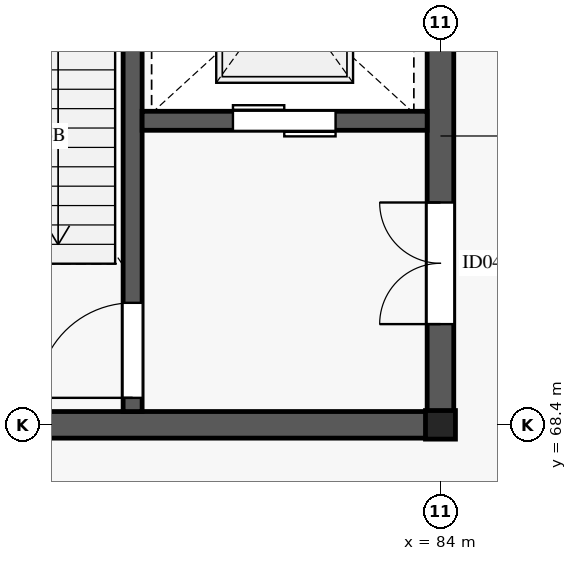
"""IFC4 building model, lengths in metres.
Left out: names, types, materials, properties, quantities, classifications, styles, units other than length and angle.
Written with IfcOpenShell. Run it as: python <this file> out.ifc"""

import sys

from ifc_helpers import new_model, si_unit, direction, frame, frame_2d, origin, origin_2d, place, context, subcontext, project, spatial, rectangle, i_section, extrude, element, fill, save


model = new_model("IFC4")
c1 = context("Model", 3, precision=1e-05, world=origin(), true_north=direction((0.0, 1.0)))
c2 = subcontext(c1, "Body", "Model", "MODEL_VIEW")
j1 = project(units=[si_unit("LENGTHUNIT", "METRE"), si_unit("PLANEANGLEUNIT", "RADIAN")], contexts=[c1])
p1 = place(None, origin())
s1 = spatial("IfcSite", under=j1, at=p1, CompositionType="ELEMENT")
p2 = place(p1, origin())
s2 = spatial("IfcBuilding", under=s1, at=p2, CompositionType="ELEMENT")
p3 = place(p2, frame((0.0, 0.0, 10.8)))
s3 = spatial("IfcBuildingStorey", under=s2, at=p3, CompositionType="ELEMENT", Elevation=10.8)
p4 = place(p3, frame((84.0, 68.4, 0.0), z_axis=(0.0, 0.0, 1.0), x_axis=(1.0, 0.0, 0.0)))
e1 = element("IfcColumn", 1, at=p4, inside=s3, PredefinedType="COLUMN", context=c2, shape_type="SweptSolid", body=[
    extrude(i_section(OverallWidth=0.394, OverallDepth=0.376, WebThickness=0.017, FlangeThickness=0.028, FilletRadius=0.015, at=origin_2d()), origin(), (0.0, 0.0, 1.0), 4.59),
])
p5 = place(p3, frame((75.825, 68.4, 0.0), z_axis=(0.0, 0.0, 1.0), x_axis=(1.0, 0.0, 0.0)))
e2 = element("IfcWall", 2, at=p5, inside=s3, PredefinedType="SHEAR", context=c2, shape_type="SweptSolid", body=[
    extrude(rectangle(XDim=8.35, YDim=0.35, at=frame_2d((4.175, 0.0))), origin(), (0.0, 0.0, 1.0), 4.59),
])
p6 = place(p3, frame((84.0, 68.575, 0.0), z_axis=(0.0, 0.0, 1.0), x_axis=(0.0, 1.0, 0.0)))
e3 = element("IfcWall", 3, at=p6, inside=s3, PredefinedType="SHEAR", context=c2, shape_type="SweptSolid", body=[
    extrude(rectangle(XDim=7.25, YDim=0.35, at=frame_2d((3.625, 0.0))), origin(), (0.0, 0.0, 1.0), 4.59),
])
p7 = place(p6, frame((1.15, 0.0, 0.0)))
e4 = element("IfcOpeningElement", 4, at=p7, cuts=e3, PredefinedType="OPENING", context=c2, shape_type="SweptSolid", body=[
    extrude(rectangle(XDim=1.6, YDim=2.35, at=frame_2d((0.8, 1.175))), frame((0.0, 0.185, 0.0), z_axis=(0.0, -1.0, 0.0), x_axis=(1.0, 0.0, 0.0)), (0.0, 0.0, 1.0), 0.37),
])
p8 = place(p3, frame((79.95, 68.575, 0.0), z_axis=(0.0, 0.0, 1.0), x_axis=(0.0, 1.0, 0.0)))
e5 = element("IfcWall", 5, at=p8, inside=s3, PredefinedType="SHEAR", context=c2, shape_type="SweptSolid", body=[
    extrude(rectangle(XDim=7.25, YDim=0.25, at=frame_2d((3.625, 0.0))), origin(), (0.0, 0.0, 1.0), 4.59),
])
p9 = place(p8, frame((0.18, 0.0, 0.0)))
e6 = element("IfcOpeningElement", 6, at=p9, cuts=e5, PredefinedType="OPENING", context=c2, shape_type="SweptSolid", body=[
    extrude(rectangle(XDim=1.25, YDim=2.2, at=frame_2d((0.625, 1.1))), frame((0.0, 0.135, 0.0), z_axis=(0.0, -1.0, 0.0), x_axis=(1.0, 0.0, 0.0)), (0.0, 0.0, 1.0), 0.27),
])
p10 = place(p3, frame((80.075, 72.4, 0.0), z_axis=(0.0, 0.0, 1.0), x_axis=(1.0, 0.0, 0.0)))
e7 = element("IfcWall", 7, at=p10, inside=s3, PredefinedType="SHEAR", context=c2, shape_type="SweptSolid", body=[
    extrude(rectangle(XDim=3.75, YDim=0.25, at=frame_2d((1.875, 0.0))), origin(), (0.0, 0.0, 1.0), 4.59),
])
p11 = place(p10, frame((1.195, 0.0, 0.0)))
e8 = element("IfcOpeningElement", 8, at=p11, cuts=e7, PredefinedType="OPENING", context=c2, shape_type="SweptSolid", body=[
    extrude(rectangle(XDim=1.35, YDim=2.2, at=frame_2d((0.675, 1.1))), frame((0.0, 0.135, 0.0), z_axis=(0.0, -1.0, 0.0), x_axis=(1.0, 0.0, 0.0)), (0.0, 0.0, 1.0), 0.27),
])
p12 = place(p9, origin())
e9 = element("IfcDoor", 9, at=p12, inside=s3, OperationType="SINGLE_SWING_LEFT", PredefinedType="DOOR", context=c2, shape_type="SweptSolid", body=[
    extrude(rectangle(XDim=1.25, YDim=2.2, at=frame_2d((0.625, 1.1))), frame((0.0, 0.025, 0.0), z_axis=(0.0, -1.0, 0.0), x_axis=(1.0, 0.0, 0.0)), (0.0, 0.0, 1.0), 0.05),
])
fill(e6, e9)
p13 = place(p7, origin())
e10 = element("IfcDoor", 10, at=p13, inside=s3, OperationType="DOUBLE_DOOR_SINGLE_SWING", PredefinedType="DOOR", context=c2, shape_type="SweptSolid", body=[
    extrude(rectangle(XDim=1.6, YDim=2.35, at=frame_2d((0.8, 1.175))), frame((0.0, 0.025, 0.0), z_axis=(0.0, -1.0, 0.0), x_axis=(1.0, 0.0, 0.0)), (0.0, 0.0, 1.0), 0.05),
])
fill(e4, e10)
p14 = place(p11, origin())
e11 = element("IfcDoor", 11, at=p14, inside=s3, OperationType="DOUBLE_DOOR_SLIDING", PredefinedType="DOOR", context=c2, shape_type="SweptSolid", body=[
    extrude(rectangle(XDim=1.35, YDim=2.2, at=frame_2d((0.675, 1.1))), frame((0.0, 0.025, 0.0), z_axis=(0.0, -1.0, 0.0), x_axis=(1.0, 0.0, 0.0)), (0.0, 0.0, 1.0), 0.05),
])
fill(e8, e11)
save(model, sys.argv[1])
